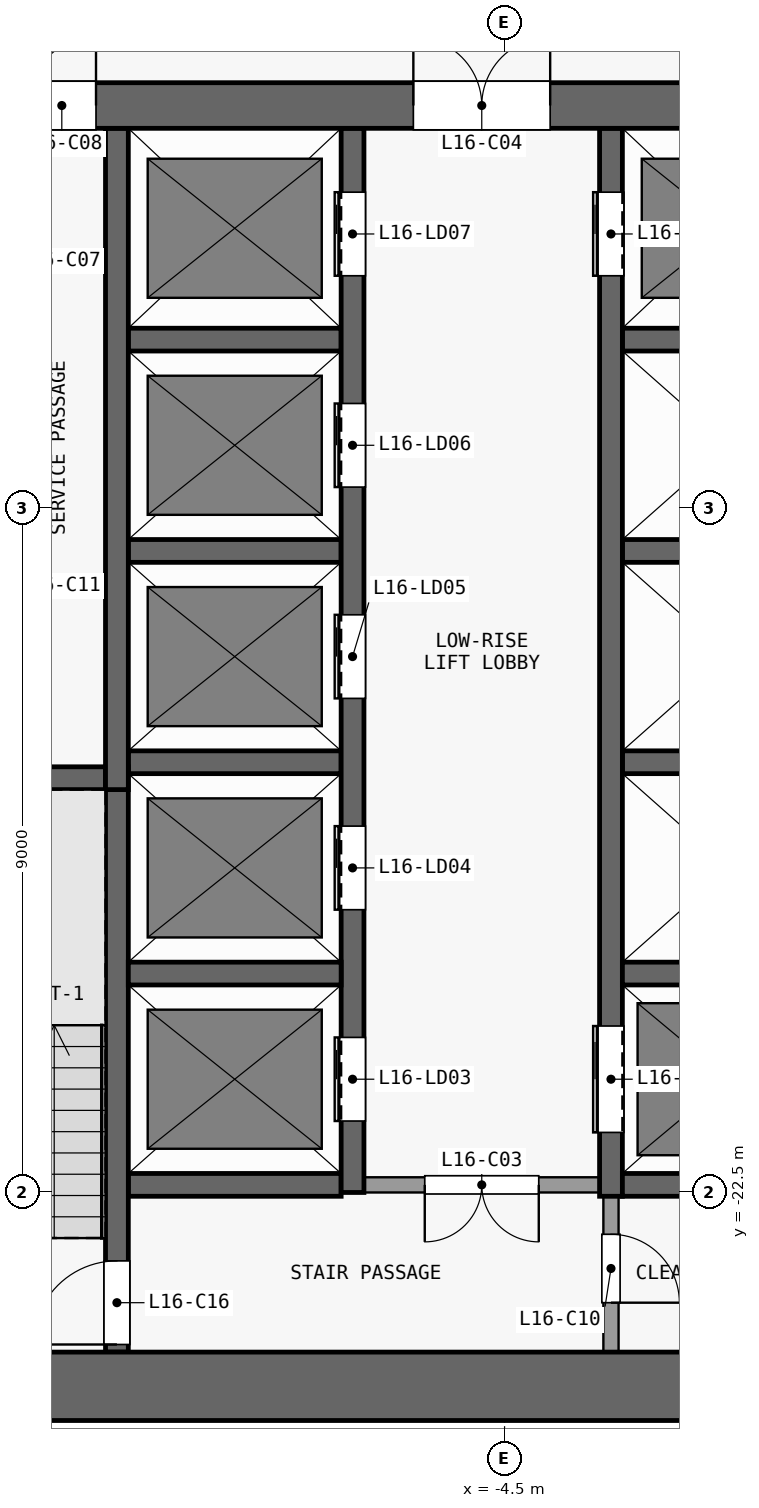
"""IFC4 building model, lengths in metres.
Left out: names, types, materials, properties, quantities, classifications, styles, units other than length and angle.
Written with IfcOpenShell. Run it as: python <this file> out.ifc"""

import sys

from ifc_helpers import new_model, si_unit, direction, frame, frame_2d, origin, place, context, subcontext, project, spatial, rectangle, extrude, element, fill, save


model = new_model("IFC4")
c1 = context("Model", 3, precision=1e-05, world=origin(), true_north=direction((0.0, 1.0)))
c2 = subcontext(c1, "Body", "Model", "MODEL_VIEW")
j1 = project(units=[si_unit("LENGTHUNIT", "METRE"), si_unit("PLANEANGLEUNIT", "RADIAN")], contexts=[c1])
p1 = place(None, origin())
s1 = spatial("IfcSite", under=j1, at=p1, CompositionType="ELEMENT")
p2 = place(p1, origin())
s2 = spatial("IfcBuilding", under=s1, at=p2, CompositionType="ELEMENT")
p3 = place(p2, frame((0.0, 0.0, 68.5)))
s3 = spatial("IfcBuildingStorey", under=s2, at=p3, CompositionType="ELEMENT", Elevation=68.5)
p4 = place(p3, frame((-13.5, -25.05, 0.0), z_axis=(0.0, 0.0, 1.0), x_axis=(1.0, 0.0, 0.0)))
e1 = element("IfcWall", 1, at=p4, inside=s3, PredefinedType="SHEAR", context=c2, shape_type="SweptSolid", body=[
    extrude(rectangle(XDim=27.0, YDim=0.9, at=frame_2d((13.5, 0.0))), origin(), (0.0, 0.0, 1.0), 3.3),
])
p5 = place(p3, frame((-13.5, -8.2, 0.0), z_axis=(0.0, 0.0, 1.0), x_axis=(1.0, 0.0, 0.0)))
e2 = element("IfcWall", 2, at=p5, inside=s3, PredefinedType="SHEAR", context=c2, shape_type="SweptSolid", body=[
    extrude(rectangle(XDim=27.0, YDim=0.6, at=frame_2d((13.5, 0.0))), origin(), (0.0, 0.0, 1.0), 3.3),
])
p6 = place(p5, frame((7.8, 0.0, 0.0)))
e3 = element("IfcOpeningElement", 3, at=p6, cuts=e2, PredefinedType="OPENING", context=c2, shape_type="SweptSolid", body=[
    extrude(rectangle(XDim=1.8, YDim=2.1, at=frame_2d((0.9, 1.05))), frame((0.0, 0.31, 0.0), z_axis=(0.0, -1.0, 0.0), x_axis=(1.0, 0.0, 0.0)), (0.0, 0.0, 1.0), 0.62),
])
p7 = place(p5, frame((17.4, 0.0, 0.0)))
e4 = element("IfcOpeningElement", 4, at=p7, cuts=e2, PredefinedType="OPENING", context=c2, shape_type="SweptSolid", body=[
    extrude(rectangle(XDim=1.8, YDim=2.1, at=frame_2d((0.9, 1.05))), frame((0.0, 0.31, 0.0), z_axis=(0.0, -1.0, 0.0), x_axis=(1.0, 0.0, 0.0)), (0.0, 0.0, 1.0), 0.62),
])
p8 = place(p5, frame((2.725, 0.0, 0.0)))
e5 = element("IfcOpeningElement", 5, at=p8, cuts=e2, PredefinedType="OPENING", context=c2, shape_type="SweptSolid", body=[
    extrude(rectangle(XDim=0.9, YDim=2.1, at=frame_2d((0.45, 1.05))), frame((0.0, 0.31, 0.0), z_axis=(0.0, -1.0, 0.0), x_axis=(1.0, 0.0, 0.0)), (0.0, 0.0, 1.0), 0.62),
])
p9 = place(p5, frame((24.075, 0.0, 0.0)))
e6 = element("IfcOpeningElement", 6, at=p9, cuts=e2, PredefinedType="OPENING", context=c2, shape_type="SweptSolid", body=[
    extrude(rectangle(XDim=1.2, YDim=2.1, at=frame_2d((0.6, 1.05))), frame((0.0, 0.31, 0.0), z_axis=(0.0, -1.0, 0.0), x_axis=(1.0, 0.0, 0.0)), (0.0, 0.0, 1.0), 0.62),
])
p10 = place(p3, frame((-9.45, -22.4, 0.0), z_axis=(0.0, 0.0, 1.0), x_axis=(1.0, 0.0, 0.0)))
e7 = element("IfcWall", 7, at=p10, inside=s3, PredefinedType="SHEAR", context=c2, shape_type="SweptSolid", body=[
    extrude(rectangle(XDim=2.8, YDim=0.3, at=frame_2d((1.4, 0.0))), origin(), (0.0, 0.0, 1.0), 3.3),
])
p11 = place(p3, frame((-3.25, -22.4, 0.0), z_axis=(0.0, 0.0, 1.0), x_axis=(-1.0, 0.0, 0.0)))
e8 = element("IfcWall", 8, at=p11, inside=s3, PredefinedType="PARTITIONING", context=c2, shape_type="SweptSolid", body=[
    extrude(rectangle(XDim=3.1, YDim=0.2, at=frame_2d((1.55, 0.0))), origin(), (0.0, 0.0, 1.0), 3.3),
])
p12 = place(p11, frame((0.8, 0.0, 0.0)))
e9 = element("IfcOpeningElement", 9, at=p12, cuts=e8, PredefinedType="OPENING", context=c2, shape_type="SweptSolid", body=[
    extrude(rectangle(XDim=1.5, YDim=2.1, at=frame_2d((0.75, 1.05))), frame((0.0, 0.11, 0.0), z_axis=(0.0, -1.0, 0.0), x_axis=(1.0, 0.0, 0.0)), (0.0, 0.0, 1.0), 0.22),
])
p13 = place(p3, frame((-2.95, -22.4, 0.0), z_axis=(0.0, 0.0, 1.0), x_axis=(1.0, 0.0, 0.0)))
e10 = element("IfcWall", 10, at=p13, inside=s3, PredefinedType="SHEAR", context=c2, shape_type="SweptSolid", body=[
    extrude(rectangle(XDim=6.2, YDim=0.3, at=frame_2d((3.1, 0.0))), origin(), (0.0, 0.0, 1.0), 3.3),
])
for number, where, z_axis, x_axis in (
    (11, (-9.45, -19.62, 0.0), (0.0, 0.0, 1.0), (1.0, 0.0, 0.0)),
    (12, (-2.95, -19.62, 0.0), (0.0, 0.0, 1.0), (1.0, 0.0, 0.0)),
):
    element("IfcWall", number, at=place(p3, frame(where, z_axis=z_axis, x_axis=x_axis)), inside=s3, PredefinedType="SHEAR", context=c2, shape_type="SweptSolid", body=[
        extrude(rectangle(XDim=2.8, YDim=0.3, at=frame_2d((1.4, 0.0))), origin(), (0.0, 0.0, 1.0), 3.3),
    ])
p14 = place(p3, frame((-12.6, -17.05, 0.0), z_axis=(0.0, 0.0, 1.0), x_axis=(1.0, 0.0, 0.0)))
e13 = element("IfcWall", 13, at=p14, inside=s3, PredefinedType="SHEAR", context=c2, shape_type="SweptSolid", body=[
    extrude(rectangle(XDim=2.85, YDim=0.3, at=frame_2d((1.425, 0.0))), origin(), (0.0, 0.0, 1.0), 3.3),
])
for number, where, z_axis, x_axis in (
    (14, (-9.45, -16.84, 0.0), (0.0, 0.0, 1.0), (1.0, 0.0, 0.0)),
    (15, (-2.95, -16.84, 0.0), (0.0, 0.0, 1.0), (1.0, 0.0, 0.0)),
    (16, (-9.45, -14.06, 0.0), (0.0, 0.0, 1.0), (1.0, 0.0, 0.0)),
    (17, (-2.95, -14.06, 0.0), (0.0, 0.0, 1.0), (1.0, 0.0, 0.0)),
    (18, (-9.45, -11.28, 0.0), (0.0, 0.0, 1.0), (1.0, 0.0, 0.0)),
    (19, (-2.95, -11.28, 0.0), (0.0, 0.0, 1.0), (1.0, 0.0, 0.0)),
):
    element("IfcWall", number, at=place(p3, frame(where, z_axis=z_axis, x_axis=x_axis)), inside=s3, PredefinedType="SHEAR", context=c2, shape_type="SweptSolid", body=[
        extrude(rectangle(XDim=2.8, YDim=0.3, at=frame_2d((1.4, 0.0))), origin(), (0.0, 0.0, 1.0), 3.3),
    ])
p15 = place(p3, frame((-9.6, -24.6, 0.0), z_axis=(0.0, 0.0, 1.0), x_axis=(0.0, 1.0, 0.0)))
e20 = element("IfcWall", 20, at=p15, inside=s3, PredefinedType="SHEAR", context=c2, shape_type="SweptSolid", body=[
    extrude(rectangle(XDim=7.7, YDim=0.3, at=frame_2d((3.85, 0.0))), origin(), (0.0, 0.0, 1.0), 3.3),
])
p16 = place(p15, frame((0.1, 0.0, 0.0)))
e21 = element("IfcOpeningElement", 21, at=p16, cuts=e20, PredefinedType="OPENING", context=c2, shape_type="SweptSolid", body=[
    extrude(rectangle(XDim=1.1, YDim=2.1, at=frame_2d((0.55, 1.05))), frame((0.0, 0.16, 0.0), z_axis=(0.0, -1.0, 0.0), x_axis=(1.0, 0.0, 0.0)), (0.0, 0.0, 1.0), 0.32),
])
p17 = place(p3, frame((-9.6, -17.2, 0.0), z_axis=(0.0, 0.0, 1.0), x_axis=(0.0, 1.0, 0.0)))
e22 = element("IfcWall", 22, at=p17, inside=s3, PredefinedType="SHEAR", context=c2, shape_type="SweptSolid", body=[
    extrude(rectangle(XDim=8.7, YDim=0.3, at=frame_2d((4.35, 0.0))), origin(), (0.0, 0.0, 1.0), 3.3),
])
p18 = place(p3, frame((-6.5, -22.5, 0.0), z_axis=(0.0, 0.0, 1.0), x_axis=(0.0, 1.0, 0.0)))
e23 = element("IfcWall", 23, at=p18, inside=s3, PredefinedType="SHEAR", context=c2, shape_type="SweptSolid", body=[
    extrude(rectangle(XDim=14.0, YDim=0.3, at=frame_2d((7.0, 0.0))), origin(), (0.0, 0.0, 1.0), 3.3),
])
p19 = place(p18, frame((0.94, 0.0, 0.0)))
e24 = element("IfcOpeningElement", 24, at=p19, cuts=e23, PredefinedType="OPENING", context=c2, shape_type="SweptSolid", body=[
    extrude(rectangle(XDim=1.1, YDim=2.1, at=frame_2d((0.55, 1.05))), frame((0.0, 0.16, 0.0), z_axis=(0.0, -1.0, 0.0), x_axis=(1.0, 0.0, 0.0)), (0.0, 0.0, 1.0), 0.32),
])
p20 = place(p18, frame((3.72, 0.0, 0.0)))
e25 = element("IfcOpeningElement", 25, at=p20, cuts=e23, PredefinedType="OPENING", context=c2, shape_type="SweptSolid", body=[
    extrude(rectangle(XDim=1.1, YDim=2.1, at=frame_2d((0.55, 1.05))), frame((0.0, 0.16, 0.0), z_axis=(0.0, -1.0, 0.0), x_axis=(1.0, 0.0, 0.0)), (0.0, 0.0, 1.0), 0.32),
])
p21 = place(p18, frame((6.5, 0.0, 0.0)))
e26 = element("IfcOpeningElement", 26, at=p21, cuts=e23, PredefinedType="OPENING", context=c2, shape_type="SweptSolid", body=[
    extrude(rectangle(XDim=1.1, YDim=2.1, at=frame_2d((0.55, 1.05))), frame((0.0, 0.16, 0.0), z_axis=(0.0, -1.0, 0.0), x_axis=(1.0, 0.0, 0.0)), (0.0, 0.0, 1.0), 0.32),
])
p22 = place(p18, frame((9.28, 0.0, 0.0)))
e27 = element("IfcOpeningElement", 27, at=p22, cuts=e23, PredefinedType="OPENING", context=c2, shape_type="SweptSolid", body=[
    extrude(rectangle(XDim=1.1, YDim=2.1, at=frame_2d((0.55, 1.05))), frame((0.0, 0.16, 0.0), z_axis=(0.0, -1.0, 0.0), x_axis=(1.0, 0.0, 0.0)), (0.0, 0.0, 1.0), 0.32),
])
p23 = place(p18, frame((12.06, 0.0, 0.0)))
e28 = element("IfcOpeningElement", 28, at=p23, cuts=e23, PredefinedType="OPENING", context=c2, shape_type="SweptSolid", body=[
    extrude(rectangle(XDim=1.1, YDim=2.1, at=frame_2d((0.55, 1.05))), frame((0.0, 0.16, 0.0), z_axis=(0.0, -1.0, 0.0), x_axis=(1.0, 0.0, 0.0)), (0.0, 0.0, 1.0), 0.32),
])
p24 = place(p3, frame((-3.1, -22.55, 0.0), z_axis=(0.0, 0.0, 1.0), x_axis=(0.0, -1.0, 0.0)))
e29 = element("IfcWall", 29, at=p24, inside=s3, PredefinedType="PARTITIONING", context=c2, shape_type="SweptSolid", body=[
    extrude(rectangle(XDim=2.05, YDim=0.2, at=frame_2d((1.025, 0.0))), origin(), (0.0, 0.0, 1.0), 3.3),
])
p25 = place(p24, frame((0.5, 0.0, 0.0)))
e30 = element("IfcOpeningElement", 30, at=p25, cuts=e29, PredefinedType="OPENING", context=c2, shape_type="SweptSolid", body=[
    extrude(rectangle(XDim=0.9, YDim=2.1, at=frame_2d((0.45, 1.05))), frame((0.0, 0.11, 0.0), z_axis=(0.0, -1.0, 0.0), x_axis=(1.0, 0.0, 0.0)), (0.0, 0.0, 1.0), 0.22),
])
p26 = place(p3, frame((-3.1, -22.55, 0.0), z_axis=(0.0, 0.0, 1.0), x_axis=(0.0, 1.0, 0.0)))
e31 = element("IfcWall", 31, at=p26, inside=s3, PredefinedType="SHEAR", context=c2, shape_type="SweptSolid", body=[
    extrude(rectangle(XDim=14.05, YDim=0.3, at=frame_2d((7.025, 0.0))), origin(), (0.0, 0.0, 1.0), 3.3),
])
p27 = place(p26, frame((12.11, 0.0, 0.0)))
e32 = element("IfcOpeningElement", 32, at=p27, cuts=e31, PredefinedType="OPENING", context=c2, shape_type="SweptSolid", body=[
    extrude(rectangle(XDim=1.1, YDim=2.1, at=frame_2d((0.55, 1.05))), frame((0.0, 0.16, 0.0), z_axis=(0.0, -1.0, 0.0), x_axis=(1.0, 0.0, 0.0)), (0.0, 0.0, 1.0), 0.32),
])
p28 = place(p26, frame((0.84, 0.0, 0.0)))
e33 = element("IfcOpeningElement", 33, at=p28, cuts=e31, PredefinedType="OPENING", context=c2, shape_type="SweptSolid", body=[
    extrude(rectangle(XDim=1.4, YDim=2.1, at=frame_2d((0.7, 1.05))), frame((0.0, 0.16, 0.0), z_axis=(0.0, -1.0, 0.0), x_axis=(1.0, 0.0, 0.0)), (0.0, 0.0, 1.0), 0.32),
])
p29 = place(p19, origin())
e34 = element("IfcDoor", 34, at=p29, inside=s3, OperationType="DOUBLE_DOOR_SLIDING", PredefinedType="DOOR", context=c2, shape_type="SweptSolid", body=[
    extrude(rectangle(XDim=1.1, YDim=2.1, at=frame_2d((0.55, 1.05))), frame((0.0, 0.025, 0.0), z_axis=(0.0, -1.0, 0.0), x_axis=(1.0, 0.0, 0.0)), (0.0, 0.0, 1.0), 0.05),
])
fill(e24, e34)
p30 = place(p20, origin())
e35 = element("IfcDoor", 35, at=p30, inside=s3, OperationType="DOUBLE_DOOR_SLIDING", PredefinedType="DOOR", context=c2, shape_type="SweptSolid", body=[
    extrude(rectangle(XDim=1.1, YDim=2.1, at=frame_2d((0.55, 1.05))), frame((0.0, 0.025, 0.0), z_axis=(0.0, -1.0, 0.0), x_axis=(1.0, 0.0, 0.0)), (0.0, 0.0, 1.0), 0.05),
])
fill(e25, e35)
p31 = place(p21, origin())
e36 = element("IfcDoor", 36, at=p31, inside=s3, OperationType="DOUBLE_DOOR_SLIDING", PredefinedType="DOOR", context=c2, shape_type="SweptSolid", body=[
    extrude(rectangle(XDim=1.1, YDim=2.1, at=frame_2d((0.55, 1.05))), frame((0.0, 0.025, 0.0), z_axis=(0.0, -1.0, 0.0), x_axis=(1.0, 0.0, 0.0)), (0.0, 0.0, 1.0), 0.05),
])
fill(e26, e36)
p32 = place(p22, origin())
e37 = element("IfcDoor", 37, at=p32, inside=s3, OperationType="DOUBLE_DOOR_SLIDING", PredefinedType="DOOR", context=c2, shape_type="SweptSolid", body=[
    extrude(rectangle(XDim=1.1, YDim=2.1, at=frame_2d((0.55, 1.05))), frame((0.0, 0.025, 0.0), z_axis=(0.0, -1.0, 0.0), x_axis=(1.0, 0.0, 0.0)), (0.0, 0.0, 1.0), 0.05),
])
fill(e27, e37)
p33 = place(p23, origin())
e38 = element("IfcDoor", 38, at=p33, inside=s3, OperationType="DOUBLE_DOOR_SLIDING", PredefinedType="DOOR", context=c2, shape_type="SweptSolid", body=[
    extrude(rectangle(XDim=1.1, YDim=2.1, at=frame_2d((0.55, 1.05))), frame((0.0, 0.025, 0.0), z_axis=(0.0, -1.0, 0.0), x_axis=(1.0, 0.0, 0.0)), (0.0, 0.0, 1.0), 0.05),
])
fill(e28, e38)
p34 = place(p27, origin())
e39 = element("IfcDoor", 39, at=p34, inside=s3, OperationType="DOUBLE_DOOR_SLIDING", PredefinedType="DOOR", context=c2, shape_type="SweptSolid", body=[
    extrude(rectangle(XDim=1.1, YDim=2.1, at=frame_2d((0.55, 1.05))), frame((0.0, 0.025, 0.0), z_axis=(0.0, -1.0, 0.0), x_axis=(1.0, 0.0, 0.0)), (0.0, 0.0, 1.0), 0.05),
])
fill(e32, e39)
p35 = place(p28, origin())
e40 = element("IfcDoor", 40, at=p35, inside=s3, OperationType="DOUBLE_DOOR_SLIDING", PredefinedType="DOOR", context=c2, shape_type="SweptSolid", body=[
    extrude(rectangle(XDim=1.4, YDim=2.1, at=frame_2d((0.7, 1.05))), frame((0.0, 0.025, 0.0), z_axis=(0.0, -1.0, 0.0), x_axis=(1.0, 0.0, 0.0)), (0.0, 0.0, 1.0), 0.05),
])
fill(e33, e40)
p36 = place(p12, origin())
e41 = element("IfcDoor", 41, at=p36, inside=s3, OperationType="DOUBLE_DOOR_SINGLE_SWING", PredefinedType="DOOR", context=c2, shape_type="SweptSolid", body=[
    extrude(rectangle(XDim=1.5, YDim=2.1, at=frame_2d((0.75, 1.05))), frame((0.0, 0.025, 0.0), z_axis=(0.0, -1.0, 0.0), x_axis=(1.0, 0.0, 0.0)), (0.0, 0.0, 1.0), 0.05),
])
fill(e9, e41)
p37 = place(p6, origin())
e42 = element("IfcDoor", 42, at=p37, inside=s3, OperationType="DOUBLE_DOOR_SINGLE_SWING", PredefinedType="DOOR", context=c2, shape_type="SweptSolid", body=[
    extrude(rectangle(XDim=1.8, YDim=2.1, at=frame_2d((0.9, 1.05))), frame((0.0, 0.025, 0.0), z_axis=(0.0, -1.0, 0.0), x_axis=(1.0, 0.0, 0.0)), (0.0, 0.0, 1.0), 0.05),
])
fill(e3, e42)
p38 = place(p8, origin())
e43 = element("IfcDoor", 43, at=p38, inside=s3, OperationType="SINGLE_SWING_RIGHT", PredefinedType="DOOR", context=c2, shape_type="SweptSolid", body=[
    extrude(rectangle(XDim=0.9, YDim=2.1, at=frame_2d((0.45, 1.05))), frame((0.0, 0.025, 0.0), z_axis=(0.0, -1.0, 0.0), x_axis=(1.0, 0.0, 0.0)), (0.0, 0.0, 1.0), 0.05),
])
fill(e5, e43)
p39 = place(p25, origin())
e44 = element("IfcDoor", 44, at=p39, inside=s3, OperationType="SINGLE_SWING_RIGHT", PredefinedType="DOOR", context=c2, shape_type="SweptSolid", body=[
    extrude(rectangle(XDim=0.9, YDim=2.1, at=frame_2d((0.45, 1.05))), frame((0.0, 0.025, 0.0), z_axis=(0.0, -1.0, 0.0), x_axis=(1.0, 0.0, 0.0)), (0.0, 0.0, 1.0), 0.05),
])
fill(e30, e44)
p40 = place(p16, origin())
e45 = element("IfcDoor", 45, at=p40, inside=s3, OperationType="SINGLE_SWING_LEFT", PredefinedType="DOOR", context=c2, shape_type="SweptSolid", body=[
    extrude(rectangle(XDim=1.1, YDim=2.1, at=frame_2d((0.55, 1.05))), frame((0.0, 0.025, 0.0), z_axis=(0.0, -1.0, 0.0), x_axis=(1.0, 0.0, 0.0)), (0.0, 0.0, 1.0), 0.05),
])
fill(e21, e45)
save(model, sys.argv[1])
